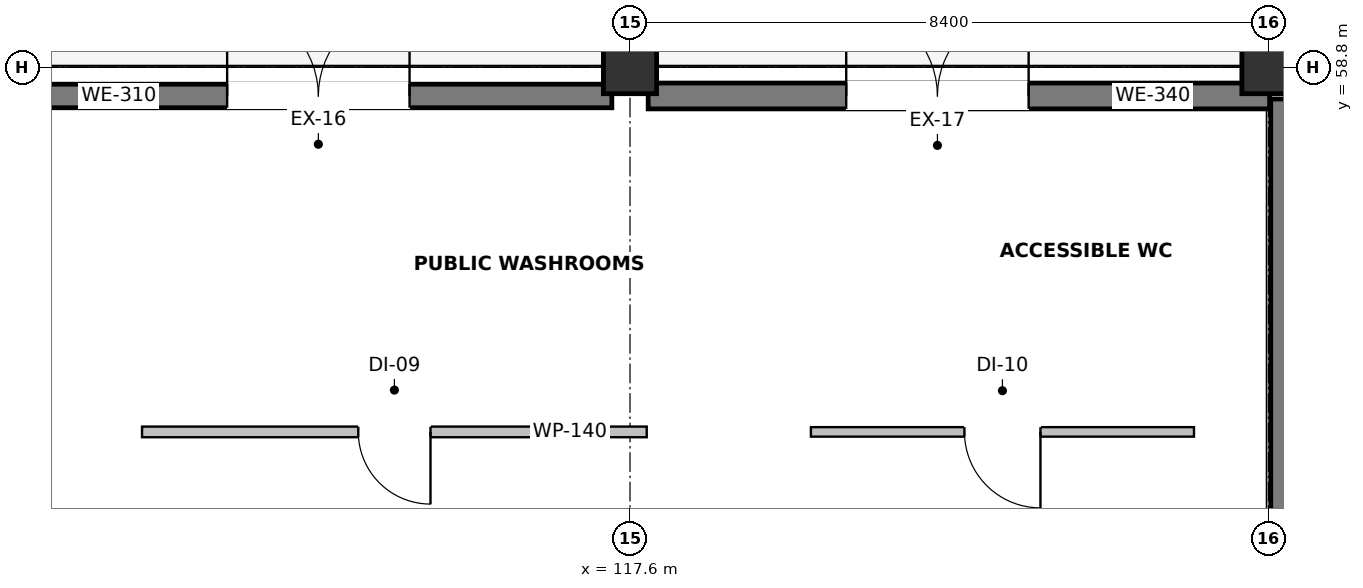
"""IFC4 building model, lengths in metres.
Left out: names, types, materials, properties, quantities, classifications, styles, units other than length and angle.
Written with IfcOpenShell. Run it as: python <this file> out.ifc"""

import sys

from ifc_helpers import new_model, si_unit, direction, frame, frame_2d, origin, origin_2d, place, context, subcontext, project, spatial, rectangle, extrude, element, fill, save


model = new_model("IFC4")
c1 = context("Model", 3, precision=1e-05, world=origin(), true_north=direction((0.0, 1.0)))
c2 = subcontext(c1, "Body", "Model", "MODEL_VIEW")
j1 = project(units=[si_unit("LENGTHUNIT", "METRE"), si_unit("PLANEANGLEUNIT", "RADIAN")], contexts=[c1])
p1 = place(None, origin())
s1 = spatial("IfcSite", under=j1, at=p1, CompositionType="ELEMENT")
p2 = place(p1, origin())
s2 = spatial("IfcBuilding", under=s1, at=p2, CompositionType="ELEMENT")
p3 = place(p2, origin())
s3 = spatial("IfcBuildingStorey", under=s2, at=p3, CompositionType="ELEMENT", Elevation=0.0)
for number, where, z_axis, x_axis in (
    (1, (117.6, 58.8, 0.0), (0.0, 0.0, 1.0), (1.0, 0.0, 0.0)),
    (2, (126.0, 58.8, 0.0), (0.0, 0.0, 1.0), (1.0, 0.0, 0.0)),
):
    element("IfcColumn", number, at=place(p3, frame(where, z_axis=z_axis, x_axis=x_axis)), inside=s3, PredefinedType="COLUMN", context=c2, shape_type="SweptSolid", body=[
        extrude(rectangle(XDim=0.7, YDim=0.7, at=origin_2d()), origin(), (0.0, 0.0, 1.0), 5.1),
    ])
p4 = place(p3, frame((109.552, 58.42, 0.0), z_axis=(0.0, 0.0, 1.0), x_axis=(1.0, 0.0, 0.0)))
e3 = element("IfcWall", 3, at=p4, inside=s3, PredefinedType="SOLIDWALL", context=c2, shape_type="SweptSolid", body=[
    extrude(rectangle(XDim=7.809, YDim=0.31, at=frame_2d((3.904, 0.0))), origin(), (0.0, 0.0, 1.0), 3.9),
])
p5 = place(p4, frame((2.748, 0.0, 0.0)))
e4 = element("IfcOpeningElement", 4, at=p5, cuts=e3, PredefinedType="OPENING", context=c2, shape_type="SweptSolid", body=[
    extrude(rectangle(XDim=2.4, YDim=2.45, at=frame_2d((1.2, 1.225))), frame((0.0, 0.167, 0.0), z_axis=(0.0, -1.0, 0.0), x_axis=(1.0, 0.0, 0.0)), (0.0, 0.0, 1.0), 0.334),
])
p6 = place(p3, frame((117.839, 58.42, 0.0), z_axis=(0.0, 0.0, 1.0), x_axis=(1.0, 0.0, 0.0)))
e5 = element("IfcWall", 5, at=p6, inside=s3, PredefinedType="SOLIDWALL", context=c2, shape_type="SweptSolid", body=[
    extrude(rectangle(XDim=8.176, YDim=0.34, at=frame_2d((4.088, 0.0))), origin(), (0.0, 0.0, 1.0), 3.9),
])
p7 = place(p6, frame((2.605, 0.0, 0.0)))
e6 = element("IfcOpeningElement", 6, at=p7, cuts=e5, PredefinedType="OPENING", context=c2, shape_type="SweptSolid", body=[
    extrude(rectangle(XDim=2.4, YDim=2.45, at=frame_2d((1.2, 1.225))), frame((0.0, 0.182, 0.0), z_axis=(0.0, -1.0, 0.0), x_axis=(1.0, 0.0, 0.0)), (0.0, 0.0, 1.0), 0.364),
])
p8 = place(p3, frame((126.18, 50.82, 0.0), z_axis=(0.0, 0.0, 1.0), x_axis=(0.0, 1.0, 0.0)))
e7 = element("IfcWall", 7, at=p8, inside=s3, PredefinedType="SHEAR", context=c2, shape_type="SweptSolid", body=[
    extrude(rectangle(XDim=7.56, YDim=0.3, at=frame_2d((3.78, 0.0))), origin(), (0.0, 0.0, 1.0), 4.7),
])
p9 = place(p3, frame((117.82, 54.0, 0.0), z_axis=(0.0, 0.0, 1.0), x_axis=(-1.0, 0.0, 0.0)))
e8 = element("IfcWall", 8, at=p9, inside=s3, PredefinedType="PARTITIONING", context=c2, shape_type="SweptSolid", body=[
    extrude(rectangle(XDim=6.64, YDim=0.14, at=frame_2d((3.32, 0.0))), origin(), (0.0, 0.0, 1.0), 4.7),
])
p10 = place(p9, frame((2.845, 0.0, 0.0)))
e9 = element("IfcOpeningElement", 9, at=p10, cuts=e8, PredefinedType="OPENING", context=c2, shape_type="SweptSolid", body=[
    extrude(rectangle(XDim=0.95, YDim=2.1, at=frame_2d((0.475, 1.05))), frame((0.0, 0.082, 0.0), z_axis=(0.0, -1.0, 0.0), x_axis=(1.0, 0.0, 0.0)), (0.0, 0.0, 1.0), 0.164),
])
p11 = place(p3, frame((125.02, 54.0, 0.0), z_axis=(0.0, 0.0, 1.0), x_axis=(-1.0, 0.0, 0.0)))
e10 = element("IfcWall", 10, at=p11, inside=s3, PredefinedType="PARTITIONING", context=c2, shape_type="SweptSolid", body=[
    extrude(rectangle(XDim=5.04, YDim=0.125, at=frame_2d((2.52, 0.0))), origin(), (0.0, 0.0, 1.0), 4.7),
])
p12 = place(p11, frame((2.02, 0.0, 0.0)))
e11 = element("IfcOpeningElement", 11, at=p12, cuts=e10, PredefinedType="OPENING", context=c2, shape_type="SweptSolid", body=[
    extrude(rectangle(XDim=1.0, YDim=2.1, at=frame_2d((0.5, 1.05))), frame((0.0, 0.074, 0.0), z_axis=(0.0, -1.0, 0.0), x_axis=(1.0, 0.0, 0.0)), (0.0, 0.0, 1.0), 0.149),
])
p13 = place(p5, origin())
e12 = element("IfcDoor", 12, at=p13, inside=s3, OperationType="DOUBLE_DOOR_SINGLE_SWING", PredefinedType="DOOR", context=c2, shape_type="SweptSolid", body=[
    extrude(rectangle(XDim=2.4, YDim=2.45, at=frame_2d((1.2, 1.225))), frame((0.0, 0.025, 0.0), z_axis=(0.0, -1.0, 0.0), x_axis=(1.0, 0.0, 0.0)), (0.0, 0.0, 1.0), 0.05),
])
fill(e4, e12)
p14 = place(p7, origin())
e13 = element("IfcDoor", 13, at=p14, inside=s3, OperationType="DOUBLE_DOOR_SINGLE_SWING", PredefinedType="DOOR", context=c2, shape_type="SweptSolid", body=[
    extrude(rectangle(XDim=2.4, YDim=2.45, at=frame_2d((1.2, 1.225))), frame((0.0, 0.025, 0.0), z_axis=(0.0, -1.0, 0.0), x_axis=(1.0, 0.0, 0.0)), (0.0, 0.0, 1.0), 0.05),
])
fill(e6, e13)
p15 = place(p10, origin())
e14 = element("IfcDoor", 14, at=p15, inside=s3, OperationType="SINGLE_SWING_LEFT", PredefinedType="DOOR", context=c2, shape_type="SweptSolid", body=[
    extrude(rectangle(XDim=0.95, YDim=2.1, at=frame_2d((0.475, 1.05))), frame((0.0, 0.025, 0.0), z_axis=(0.0, -1.0, 0.0), x_axis=(1.0, 0.0, 0.0)), (0.0, 0.0, 1.0), 0.05),
])
fill(e9, e14)
p16 = place(p12, origin())
e15 = element("IfcDoor", 15, at=p16, inside=s3, OperationType="SINGLE_SWING_LEFT", PredefinedType="DOOR", context=c2, shape_type="SweptSolid", body=[
    extrude(rectangle(XDim=1.0, YDim=2.1, at=frame_2d((0.5, 1.05))), frame((0.0, 0.025, 0.0), z_axis=(0.0, -1.0, 0.0), x_axis=(1.0, 0.0, 0.0)), (0.0, 0.0, 1.0), 0.05),
])
fill(e11, e15)
save(model, sys.argv[1])
